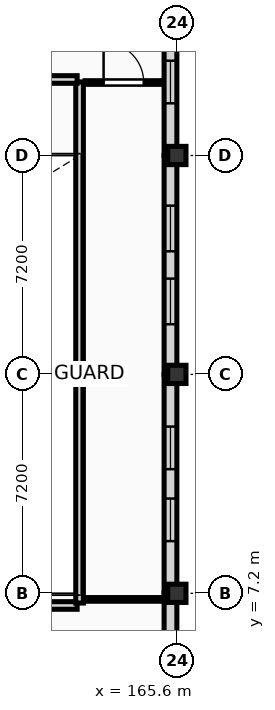
"""IFC4 building model, lengths in metres.
Left out: names, types, materials, properties, quantities, classifications, styles, units other than length and angle.
Written with IfcOpenShell. Run it as: python <this file> out.ifc"""

import sys

from ifc_helpers import new_model, si_unit, direction, frame, frame_2d, origin, origin_2d, place, context, subcontext, project, spatial, rectangle, extrude, element, fill, save


model = new_model("IFC4")
c1 = context("Model", 3, precision=1e-05, world=origin(), true_north=direction((0.0, 1.0)))
c2 = subcontext(c1, "Body", "Model", "MODEL_VIEW")
j1 = project(units=[si_unit("LENGTHUNIT", "METRE"), si_unit("PLANEANGLEUNIT", "RADIAN")], contexts=[c1])
p1 = place(None, origin())
s1 = spatial("IfcSite", under=j1, at=p1, CompositionType="ELEMENT")
p2 = place(p1, origin())
s2 = spatial("IfcBuilding", under=s1, at=p2, CompositionType="ELEMENT")
p3 = place(p2, frame((0.0, 0.0, 4.5)))
s3 = spatial("IfcBuildingStorey", under=s2, at=p3, CompositionType="ELEMENT", Elevation=4.5)
for number, where, z_axis, x_axis in (
    (1, (165.6, 7.2, 0.0), (0.0, 0.0, 1.0), (1.0, 0.0, 0.0)),
    (2, (165.6, 14.4, 0.0), (0.0, 0.0, 1.0), (1.0, 0.0, 0.0)),
    (3, (165.6, 21.6, 0.0), (0.0, 0.0, 1.0), (1.0, 0.0, 0.0)),
):
    element("IfcColumn", number, at=place(p3, frame(where, z_axis=z_axis, x_axis=x_axis)), inside=s3, PredefinedType="COLUMN", context=c2, shape_type="SweptSolid", body=[
        extrude(rectangle(XDim=0.6, YDim=0.6, at=origin_2d()), origin(), (0.0, 0.0, 1.0), 4.05),
    ])
p4 = place(p3, frame((165.39, 21.6, 0.0), z_axis=(0.0, 0.0, 1.0), x_axis=(0.0, 1.0, 0.0)))
e4 = element("IfcWall", 4, at=p4, inside=s3, PredefinedType="SOLIDWALL", context=c2, shape_type="SweptSolid", body=[
    extrude(rectangle(XDim=7.2, YDim=0.42, at=frame_2d((3.6, 0.0))), origin(), (0.0, 0.0, 1.0), 3.114),
])
p5 = place(p4, frame((1.717, 0.0, 0.45)))
e5 = element("IfcOpeningElement", 5, at=p5, cuts=e4, PredefinedType="OPENING", context=c2, shape_type="SweptSolid", body=[
    extrude(rectangle(XDim=1.4, YDim=2.38, at=frame_2d((0.7, 1.19))), frame((0.0, 0.222, 0.0), z_axis=(0.0, -1.0, 0.0), x_axis=(1.0, 0.0, 0.0)), (0.0, 0.0, 1.0), 0.444),
])
p6 = place(p4, frame((4.083, 0.0, 0.45)))
e6 = element("IfcOpeningElement", 6, at=p6, cuts=e4, PredefinedType="OPENING", context=c2, shape_type="SweptSolid", body=[
    extrude(rectangle(XDim=1.4, YDim=2.38, at=frame_2d((0.7, 1.19))), frame((0.0, 0.222, 0.0), z_axis=(0.0, -1.0, 0.0), x_axis=(1.0, 0.0, 0.0)), (0.0, 0.0, 1.0), 0.444),
])
p7 = place(p3, frame((165.39, 14.4, 0.0), z_axis=(0.0, 0.0, 1.0), x_axis=(0.0, 1.0, 0.0)))
e7 = element("IfcWall", 7, at=p7, inside=s3, PredefinedType="SOLIDWALL", context=c2, shape_type="SweptSolid", body=[
    extrude(rectangle(XDim=7.2, YDim=0.42, at=frame_2d((3.6, 0.0))), origin(), (0.0, 0.0, 1.0), 3.16),
])
p8 = place(p7, frame((1.65, 0.0, 0.45)))
e8 = element("IfcOpeningElement", 8, at=p8, cuts=e7, PredefinedType="OPENING", context=c2, shape_type="SweptSolid", body=[
    extrude(rectangle(XDim=1.5, YDim=2.4, at=frame_2d((0.75, 1.2))), frame((0.0, 0.222, 0.0), z_axis=(0.0, -1.0, 0.0), x_axis=(1.0, 0.0, 0.0)), (0.0, 0.0, 1.0), 0.444),
])
p9 = place(p7, frame((4.05, 0.0, 0.45)))
e9 = element("IfcOpeningElement", 9, at=p9, cuts=e7, PredefinedType="OPENING", context=c2, shape_type="SweptSolid", body=[
    extrude(rectangle(XDim=1.5, YDim=2.4, at=frame_2d((0.75, 1.2))), frame((0.0, 0.222, 0.0), z_axis=(0.0, -1.0, 0.0), x_axis=(1.0, 0.0, 0.0)), (0.0, 0.0, 1.0), 0.444),
])
p10 = place(p3, frame((165.39, 7.2, 0.0), z_axis=(0.0, 0.0, 1.0), x_axis=(0.0, 1.0, 0.0)))
e10 = element("IfcWall", 10, at=p10, inside=s3, PredefinedType="SOLIDWALL", context=c2, shape_type="SweptSolid", body=[
    extrude(rectangle(XDim=7.2, YDim=0.42, at=frame_2d((3.6, 0.0))), origin(), (0.0, 0.0, 1.0), 3.16),
])
p11 = place(p10, frame((1.717, 0.0, 0.45)))
e11 = element("IfcOpeningElement", 11, at=p11, cuts=e10, PredefinedType="OPENING", context=c2, shape_type="SweptSolid", body=[
    extrude(rectangle(XDim=1.4, YDim=2.38, at=frame_2d((0.7, 1.19))), frame((0.0, 0.222, 0.0), z_axis=(0.0, -1.0, 0.0), x_axis=(1.0, 0.0, 0.0)), (0.0, 0.0, 1.0), 0.444),
])
p12 = place(p10, frame((4.083, 0.0, 0.45)))
e12 = element("IfcOpeningElement", 12, at=p12, cuts=e10, PredefinedType="OPENING", context=c2, shape_type="SweptSolid", body=[
    extrude(rectangle(XDim=1.4, YDim=2.38, at=frame_2d((0.7, 1.19))), frame((0.0, 0.222, 0.0), z_axis=(0.0, -1.0, 0.0), x_axis=(1.0, 0.0, 0.0)), (0.0, 0.0, 1.0), 0.444),
])
p13 = place(p3, frame((165.39, 0.0, 0.0), z_axis=(0.0, 0.0, 1.0), x_axis=(0.0, 1.0, 0.0)))
e13 = element("IfcWall", 13, at=p13, inside=s3, PredefinedType="SOLIDWALL", context=c2, shape_type="SweptSolid", body=[
    extrude(rectangle(XDim=7.2, YDim=0.42, at=frame_2d((3.6, 0.0))), origin(), (0.0, 0.0, 1.0), 3.114),
])
p14 = place(p13, frame((1.65, 0.0, 0.45)))
e14 = element("IfcOpeningElement", 14, at=p14, cuts=e13, PredefinedType="OPENING", context=c2, shape_type="SweptSolid", body=[
    extrude(rectangle(XDim=1.5, YDim=2.4, at=frame_2d((0.75, 1.2))), frame((0.0, 0.222, 0.0), z_axis=(0.0, -1.0, 0.0), x_axis=(1.0, 0.0, 0.0)), (0.0, 0.0, 1.0), 0.444),
])
p15 = place(p13, frame((4.05, 0.0, 0.45)))
e15 = element("IfcOpeningElement", 15, at=p15, cuts=e13, PredefinedType="OPENING", context=c2, shape_type="SweptSolid", body=[
    extrude(rectangle(XDim=1.5, YDim=2.4, at=frame_2d((0.75, 1.2))), frame((0.0, 0.222, 0.0), z_axis=(0.0, -1.0, 0.0), x_axis=(1.0, 0.0, 0.0)), (0.0, 0.0, 1.0), 0.444),
])
p16 = place(p2, origin())
s4 = spatial("IfcBuildingStorey", under=s2, at=p16, CompositionType="ELEMENT", Elevation=0.0)
p17 = place(p16, frame((139.08, 6.8, 0.0), z_axis=(0.0, 0.0, 1.0), x_axis=(1.0, 0.0, 0.0)))
e16 = element("IfcWall", 16, at=p17, inside=s4, PredefinedType="PARTITIONING", context=c2, shape_type="SweptSolid", body=[
    extrude(rectangle(XDim=23.24, YDim=0.25, at=frame_2d((11.62, 0.0))), origin(), (0.0, 0.0, 1.0), 7.525),
])
p18 = place(p16, frame((162.4, 6.88, 0.0), z_axis=(0.0, 0.0, 1.0), x_axis=(0.0, 1.0, 0.0)))
e17 = element("IfcWall", 17, at=p18, inside=s4, PredefinedType="PARTITIONING", context=c2, shape_type="SweptSolid", body=[
    extrude(rectangle(XDim=17.14, YDim=0.25, at=frame_2d((8.57, 0.0))), origin(), (0.0, 0.0, 1.0), 8.185),
])
p19 = place(p16, frame((139.08, 24.1, 0.0), z_axis=(0.0, 0.0, 1.0), x_axis=(1.0, 0.0, 0.0)))
e18 = element("IfcWall", 18, at=p19, inside=s4, PredefinedType="PARTITIONING", context=c2, shape_type="SweptSolid", body=[
    extrude(rectangle(XDim=23.24, YDim=0.25, at=frame_2d((11.62, 0.0))), origin(), (0.0, 0.0, 1.0), 8.185),
])
p20 = place(p19, frame((10.282, 0.0, 0.0)))
e19 = element("IfcOpeningElement", 19, at=p20, cuts=e18, PredefinedType="OPENING", context=c2, shape_type="SweptSolid", body=[
    extrude(rectangle(XDim=1.8, YDim=2.3, at=frame_2d((0.9, 1.15))), frame((0.0, 0.137, 0.0), z_axis=(0.0, -1.0, 0.0), x_axis=(1.0, 0.0, 0.0)), (0.0, 0.0, 1.0), 0.274),
])
p21 = place(p3, frame((162.58, 7.0, 0.0), z_axis=(0.0, 0.0, 1.0), x_axis=(1.0, 0.0, 0.0)))
e20 = element("IfcWall", 20, at=p21, inside=s3, PredefinedType="PARTITIONING", context=c2, shape_type="SweptSolid", body=[
    extrude(rectangle(XDim=2.54, YDim=0.12, at=frame_2d((1.27, 0.0))), origin(), (0.0, 0.0, 1.0), 3.025),
])
p22 = place(p3, frame((162.58, 24.0, 0.0), z_axis=(0.0, 0.0, 1.0), x_axis=(1.0, 0.0, 0.0)))
e21 = element("IfcWall", 21, at=p22, inside=s3, PredefinedType="PARTITIONING", context=c2, shape_type="SweptSolid", body=[
    extrude(rectangle(XDim=2.54, YDim=0.12, at=frame_2d((1.27, 0.0))), origin(), (0.0, 0.0, 1.0), 3.775),
])
p23 = place(p22, frame((0.61, 0.0, 0.0)))
e22 = element("IfcOpeningElement", 22, at=p23, cuts=e21, PredefinedType="OPENING", context=c2, shape_type="SweptSolid", body=[
    extrude(rectangle(XDim=1.32, YDim=2.2, at=frame_2d((0.66, 1.1))), frame((0.0, 0.072, 0.0), z_axis=(0.0, -1.0, 0.0), x_axis=(1.0, 0.0, 0.0)), (0.0, 0.0, 1.0), 0.144),
])
p24 = place(p5, origin())
e23 = element("IfcWindow", 23, at=p24, inside=s3, PartitioningType="SINGLE_PANEL", PredefinedType="WINDOW", context=c2, shape_type="SweptSolid", body=[
    extrude(rectangle(XDim=1.4, YDim=2.38, at=frame_2d((0.7, 1.19))), frame((0.0, 0.03, 0.0), z_axis=(0.0, -1.0, 0.0), x_axis=(1.0, 0.0, 0.0)), (0.0, 0.0, 1.0), 0.06),
])
fill(e5, e23)
p25 = place(p8, origin())
e24 = element("IfcWindow", 24, at=p25, inside=s3, PartitioningType="SINGLE_PANEL", PredefinedType="WINDOW", context=c2, shape_type="SweptSolid", body=[
    extrude(rectangle(XDim=1.5, YDim=2.4, at=frame_2d((0.75, 1.2))), frame((0.0, 0.03, 0.0), z_axis=(0.0, -1.0, 0.0), x_axis=(1.0, 0.0, 0.0)), (0.0, 0.0, 1.0), 0.06),
])
fill(e8, e24)
p26 = place(p9, origin())
e25 = element("IfcWindow", 25, at=p26, inside=s3, PartitioningType="SINGLE_PANEL", PredefinedType="WINDOW", context=c2, shape_type="SweptSolid", body=[
    extrude(rectangle(XDim=1.5, YDim=2.4, at=frame_2d((0.75, 1.2))), frame((0.0, 0.03, 0.0), z_axis=(0.0, -1.0, 0.0), x_axis=(1.0, 0.0, 0.0)), (0.0, 0.0, 1.0), 0.06),
])
fill(e9, e25)
p27 = place(p11, origin())
e26 = element("IfcWindow", 26, at=p27, inside=s3, PartitioningType="SINGLE_PANEL", PredefinedType="WINDOW", context=c2, shape_type="SweptSolid", body=[
    extrude(rectangle(XDim=1.4, YDim=2.38, at=frame_2d((0.7, 1.19))), frame((0.0, 0.03, 0.0), z_axis=(0.0, -1.0, 0.0), x_axis=(1.0, 0.0, 0.0)), (0.0, 0.0, 1.0), 0.06),
])
fill(e11, e26)
p28 = place(p12, origin())
e27 = element("IfcWindow", 27, at=p28, inside=s3, PartitioningType="SINGLE_PANEL", PredefinedType="WINDOW", context=c2, shape_type="SweptSolid", body=[
    extrude(rectangle(XDim=1.4, YDim=2.38, at=frame_2d((0.7, 1.19))), frame((0.0, 0.03, 0.0), z_axis=(0.0, -1.0, 0.0), x_axis=(1.0, 0.0, 0.0)), (0.0, 0.0, 1.0), 0.06),
])
fill(e12, e27)
p29 = place(p23, origin())
e28 = element("IfcDoor", 28, at=p29, inside=s3, OperationType="SINGLE_SWING_LEFT", PredefinedType="DOOR", context=c2, shape_type="SweptSolid", body=[
    extrude(rectangle(XDim=1.32, YDim=2.2, at=frame_2d((0.66, 1.1))), frame((0.0, 0.025, 0.0), z_axis=(0.0, -1.0, 0.0), x_axis=(1.0, 0.0, 0.0)), (0.0, 0.0, 1.0), 0.05),
])
fill(e22, e28)
save(model, sys.argv[1])
